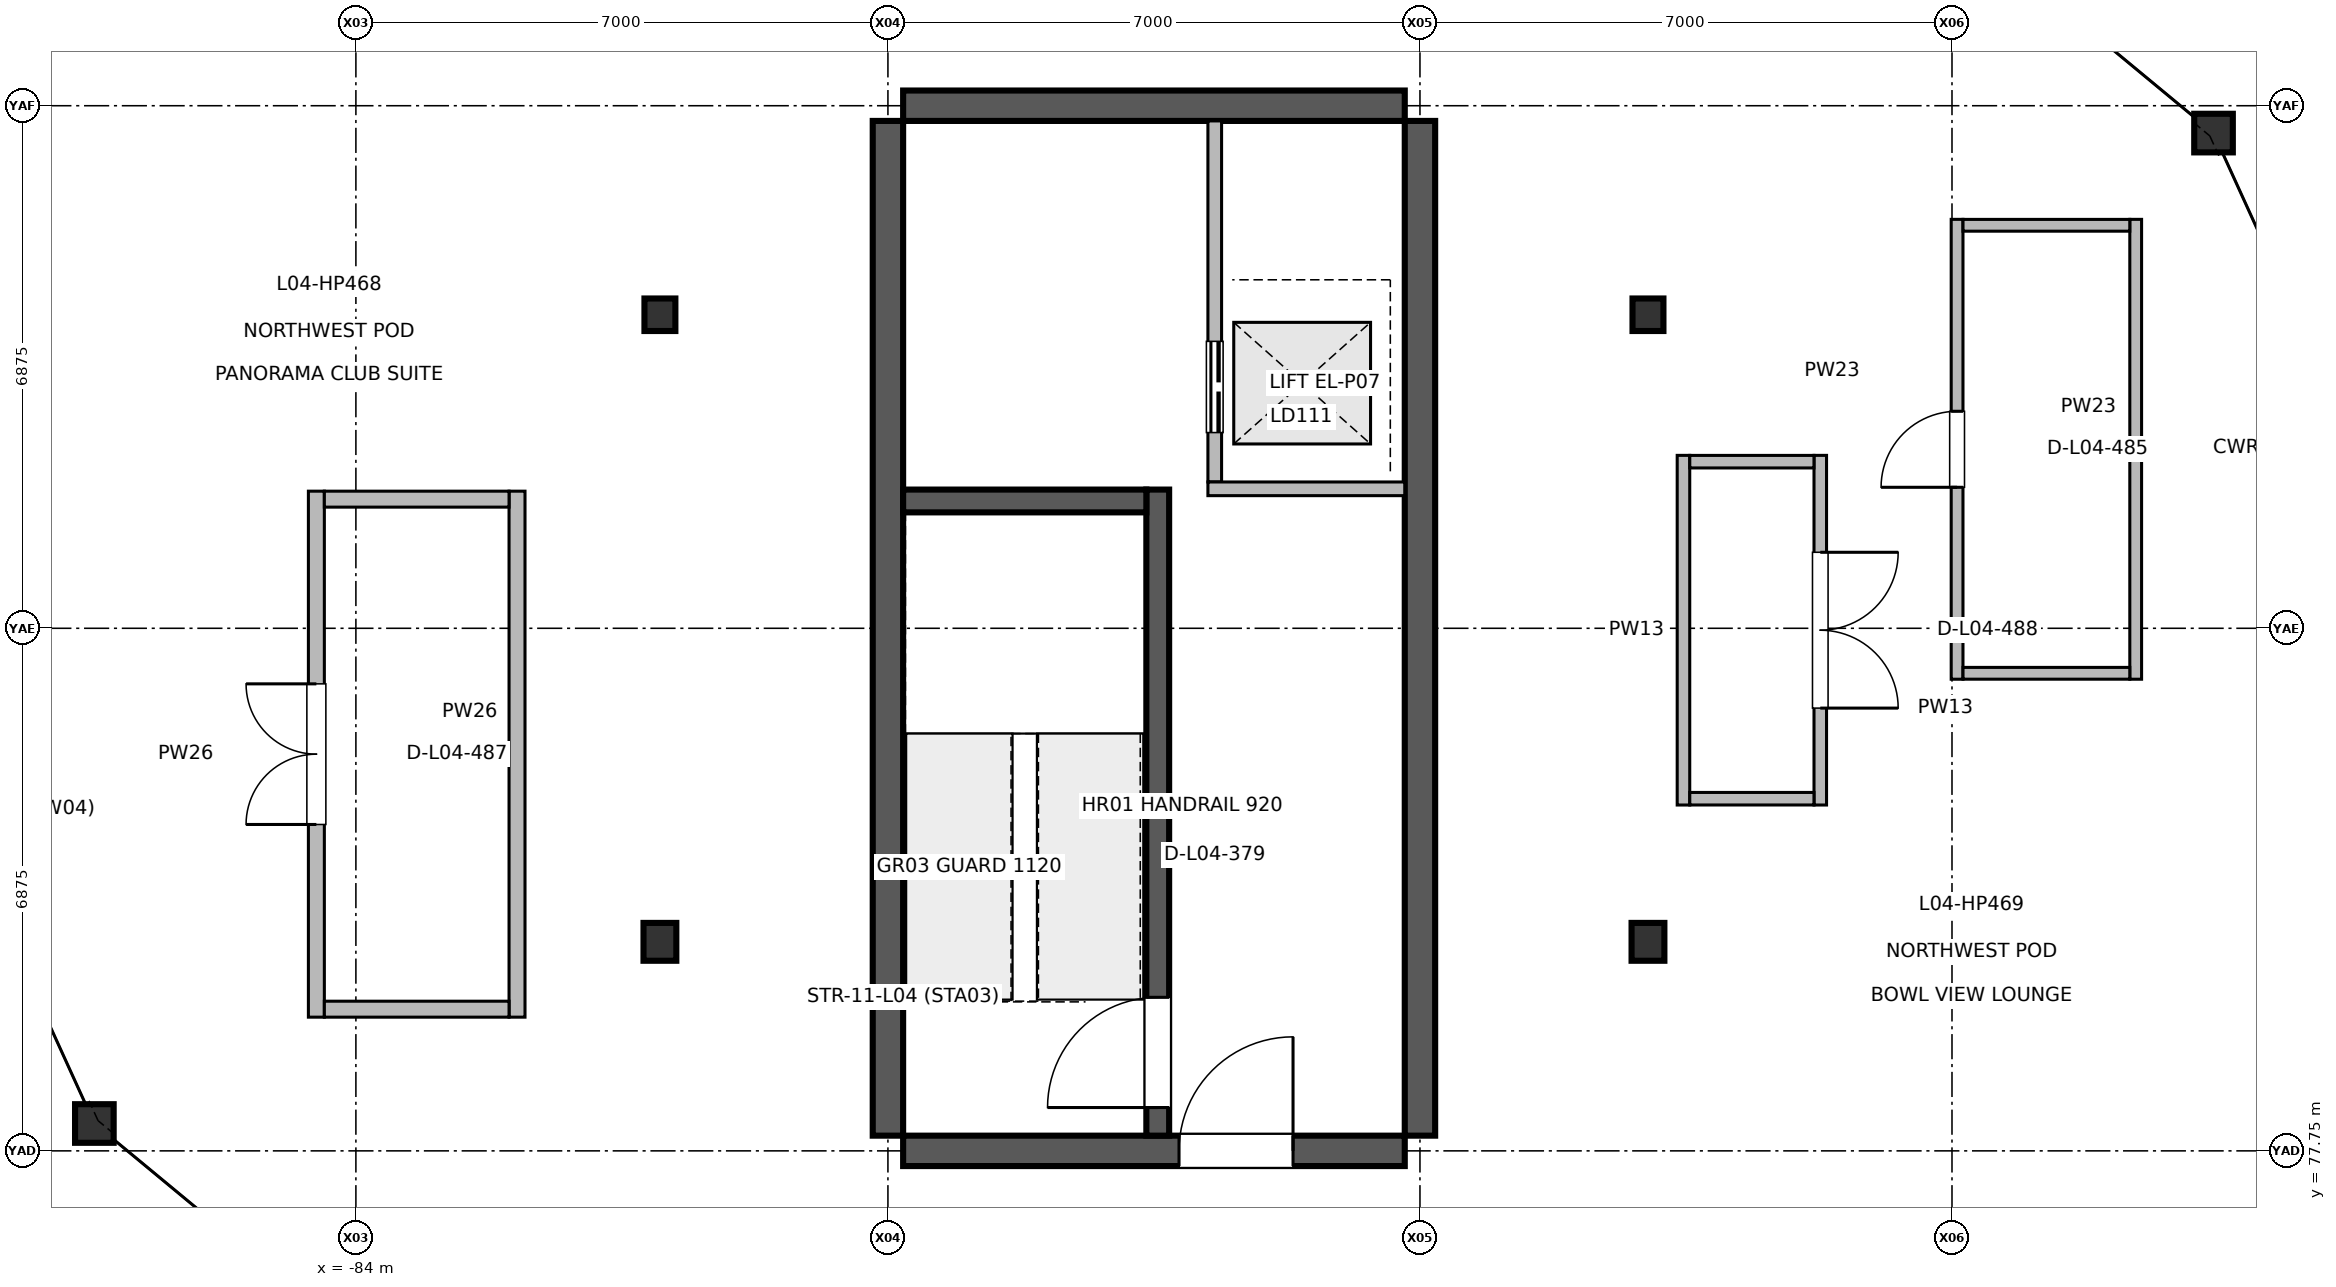
"""IFC4 building model, lengths in metres.
Left out: names, types, materials, properties, quantities, classifications, styles, units other than length and angle.
Written with IfcOpenShell. Run it as: python <this file> out.ifc"""

import sys

from ifc_helpers import new_model, si_unit, direction, frame, frame_2d, origin, origin_2d, place, context, subcontext, project, spatial, rectangle, hollow_circle, i_section, extrude, element, fill, save


model = new_model("IFC4")
c1 = context("Model", 3, precision=1e-05, world=origin(), true_north=direction((0.0, 1.0)))
c2 = subcontext(c1, "Body", "Model", "MODEL_VIEW")
j1 = project(units=[si_unit("LENGTHUNIT", "METRE"), si_unit("PLANEANGLEUNIT", "RADIAN")], contexts=[c1])
p1 = place(None, origin())
s1 = spatial("IfcSite", under=j1, at=p1, CompositionType="ELEMENT")
p2 = place(p1, origin())
s2 = spatial("IfcBuilding", under=s1, at=p2, CompositionType="ELEMENT")
p3 = place(p2, frame((0.0, 0.0, 16.2)))
s3 = spatial("IfcBuildingStorey", under=s2, at=p3, CompositionType="ELEMENT", Elevation=16.2)
for number, where, z_axis, x_axis in (
    (1, (-80.0, 80.5, 0.0), (0.0, 0.0, 1.0), (1.0, 0.0, 0.0)),
    (2, (-67.0, 80.5, 0.0), (0.0, 0.0, 1.0), (1.0, 0.0, 0.0)),
):
    element("IfcColumn", number, at=place(p3, frame(where, z_axis=z_axis, x_axis=x_axis)), inside=s3, PredefinedType="COLUMN", context=c2, shape_type="SweptSolid", body=[
        extrude(i_section(OverallWidth=0.432, OverallDepth=0.498, WebThickness=0.024, FlangeThickness=0.038, at=origin_2d()), origin(), (0.0, 0.0, 1.0), 4.798),
    ])
for number, where, z_axis, x_axis in (
    (3, (-80.0, 88.75, 0.0), (0.0, 0.0, 1.0), (1.0, 0.0, 0.0)),
    (4, (-67.0, 88.75, 0.0), (0.0, 0.0, 1.0), (1.0, 0.0, 0.0)),
):
    element("IfcColumn", number, at=place(p3, frame(where, z_axis=z_axis, x_axis=x_axis)), inside=s3, PredefinedType="COLUMN", context=c2, shape_type="SweptSolid", body=[
        extrude(i_section(OverallWidth=0.407, OverallDepth=0.428, WebThickness=0.02, FlangeThickness=0.035, at=origin_2d()), origin(), (0.0, 0.0, 1.0), 4.798),
    ])
for number, where, z_axis, x_axis in (
    (5, (-59.559, 91.14, 0.0), (0.0, 0.0, 1.0), (1.0, 0.0, 0.0)),
    (6, (-87.441, 78.11, 0.0), (0.0, 0.0, 1.0), (1.0, 0.0, 0.0)),
):
    element("IfcColumn", number, at=place(p3, frame(where, z_axis=z_axis, x_axis=x_axis)), inside=s3, PredefinedType="COLUMN", context=c2, shape_type="SweptSolid", body=[
        extrude(hollow_circle(Radius=0.254, WallThickness=0.025, at=origin_2d()), origin(), (0.0, 0.0, 1.0), 4.798),
    ])
for number, where, z_axis, x_axis in (
    (7, (-77.0, 77.95, 0.0), (0.0, 0.0, 1.0), (0.0, 1.0, 0.0)),
    (8, (-70.0, 77.95, 0.0), (0.0, 0.0, 1.0), (0.0, 1.0, 0.0)),
):
    element("IfcWall", number, at=place(p3, frame(where, z_axis=z_axis, x_axis=x_axis)), inside=s3, PredefinedType="SHEAR", context=c2, shape_type="SweptSolid", body=[
        extrude(rectangle(XDim=13.35, YDim=0.4, at=frame_2d((6.675, 0.0))), origin(), (0.0, 0.0, 1.0), 4.52),
    ])
p4 = place(p3, frame((-76.8, 77.75, 0.0), z_axis=(0.0, 0.0, 1.0), x_axis=(1.0, 0.0, 0.0)))
e9 = element("IfcWall", 9, at=p4, inside=s3, PredefinedType="SHEAR", context=c2, shape_type="SweptSolid", body=[
    extrude(rectangle(XDim=6.6, YDim=0.4, at=frame_2d((3.3, 0.0))), origin(), (0.0, 0.0, 1.0), 4.52),
])
p5 = place(p4, frame((3.63, 0.0, 0.0)))
e10 = element("IfcOpeningElement", 10, at=p5, cuts=e9, PredefinedType="OPENING", context=c2, shape_type="SweptSolid", body=[
    extrude(rectangle(XDim=1.5, YDim=2.2, at=frame_2d((0.75, 1.1))), frame((0.0, 0.21, 0.0), z_axis=(0.0, -1.0, 0.0), x_axis=(1.0, 0.0, 0.0)), (0.0, 0.0, 1.0), 0.42),
])
p6 = place(p3, frame((-76.8, 91.5, 0.0), z_axis=(0.0, 0.0, 1.0), x_axis=(1.0, 0.0, 0.0)))
e11 = element("IfcWall", 11, at=p6, inside=s3, PredefinedType="SHEAR", context=c2, shape_type="SweptSolid", body=[
    extrude(rectangle(XDim=6.6, YDim=0.4, at=frame_2d((3.3, 0.0))), origin(), (0.0, 0.0, 1.0), 4.52),
])
p7 = place(p3, frame((-73.45, 77.95, 0.0), z_axis=(0.0, 0.0, 1.0), x_axis=(0.0, 1.0, 0.0)))
e12 = element("IfcWall", 12, at=p7, inside=s3, PredefinedType="SHEAR", context=c2, shape_type="SweptSolid", body=[
    extrude(rectangle(XDim=8.5, YDim=0.3, at=frame_2d((4.25, 0.0))), origin(), (0.0, 0.0, 1.0), 4.52),
])
p8 = place(p7, frame((0.37, 0.0, 0.0)))
e13 = element("IfcOpeningElement", 13, at=p8, cuts=e12, PredefinedType="OPENING", context=c2, shape_type="SweptSolid", body=[
    extrude(rectangle(XDim=1.45, YDim=2.2, at=frame_2d((0.725, 1.1))), frame((0.0, 0.16, 0.0), z_axis=(0.0, -1.0, 0.0), x_axis=(1.0, 0.0, 0.0)), (0.0, 0.0, 1.0), 0.32),
])
p9 = place(p3, frame((-72.7, 86.55, 0.0), z_axis=(0.0, 0.0, 1.0), x_axis=(0.0, 1.0, 0.0)))
e14 = element("IfcWall", 14, at=p9, inside=s3, PredefinedType="PARTITIONING", context=c2, shape_type="SweptSolid", body=[
    extrude(rectangle(XDim=4.75, YDim=0.18, at=frame_2d((2.375, 0.0))), origin(), (0.0, 0.0, 1.0), 3.745),
])
p10 = place(p9, frame((0.65, 0.0, 0.0)))
e15 = element("IfcOpeningElement", 15, at=p10, cuts=e14, PredefinedType="OPENING", context=c2, shape_type="SweptSolid", body=[
    extrude(rectangle(XDim=1.2, YDim=2.25, at=frame_2d((0.6, 1.125))), frame((0.0, 0.1, 0.0), z_axis=(0.0, -1.0, 0.0), x_axis=(1.0, 0.0, 0.0)), (0.0, 0.0, 1.0), 0.2),
])
p11 = place(p3, frame((-62.933, 83.955, 0.0), z_axis=(0.0, 0.0, 1.0), x_axis=(0.0, 1.0, 0.0)))
e16 = element("IfcWall", 16, at=p11, inside=s3, PredefinedType="PARTITIONING", context=c2, shape_type="SweptSolid", body=[
    extrude(rectangle(XDim=6.05, YDim=0.155, at=frame_2d((3.025, 0.0))), origin(), (0.0, 0.0, 1.0), 3.82),
])
p12 = place(p11, frame((2.525, 0.0, 0.0)))
e17 = element("IfcOpeningElement", 17, at=p12, cuts=e16, PredefinedType="OPENING", context=c2, shape_type="SweptSolid", body=[
    extrude(rectangle(XDim=1.0, YDim=2.15, at=frame_2d((0.5, 1.075))), frame((0.0, 0.087, 0.0), z_axis=(0.0, -1.0, 0.0), x_axis=(1.0, 0.0, 0.0)), (0.0, 0.0, 1.0), 0.175),
])
p13 = place(p3, frame((-84.52, 79.509, 0.0), z_axis=(0.0, 0.0, 1.0), x_axis=(0.0, 1.0, 0.0)))
e18 = element("IfcWall", 18, at=p13, inside=s3, PredefinedType="PARTITIONING", context=c2, shape_type="SweptSolid", body=[
    extrude(rectangle(XDim=6.92, YDim=0.21, at=frame_2d((3.46, 0.0))), origin(), (0.0, 0.0, 1.0), 3.82),
])
p14 = place(p13, frame((2.535, 0.0, 0.0)))
e19 = element("IfcOpeningElement", 19, at=p14, cuts=e18, PredefinedType="OPENING", context=c2, shape_type="SweptSolid", body=[
    extrude(rectangle(XDim=1.85, YDim=2.4, at=frame_2d((0.925, 1.2))), frame((0.0, 0.115, 0.0), z_axis=(0.0, -1.0, 0.0), x_axis=(1.0, 0.0, 0.0)), (0.0, 0.0, 1.0), 0.23),
])
p15 = place(p3, frame((-64.733, 86.9, 0.0), z_axis=(0.0, 0.0, 1.0), x_axis=(0.0, -1.0, 0.0)))
e20 = element("IfcWall", 20, at=p15, inside=s3, PredefinedType="PARTITIONING", context=c2, shape_type="SweptSolid", body=[
    extrude(rectangle(XDim=4.6, YDim=0.165, at=frame_2d((2.3, 0.0))), origin(), (0.0, 0.0, 1.0), 3.82),
])
p16 = place(p15, frame((1.275, 0.0, 0.0)))
e21 = element("IfcOpeningElement", 21, at=p16, cuts=e20, PredefinedType="OPENING", context=c2, shape_type="SweptSolid", body=[
    extrude(rectangle(XDim=2.05, YDim=2.4, at=frame_2d((1.025, 1.2))), frame((0.0, 0.093, 0.0), z_axis=(0.0, -1.0, 0.0), x_axis=(1.0, 0.0, 0.0)), (0.0, 0.0, 1.0), 0.185),
])
p17 = place(p3, frame((-72.79, 86.46, 0.0), z_axis=(0.0, 0.0, 1.0), x_axis=(1.0, 0.0, 0.0)))
e22 = element("IfcWall", 22, at=p17, inside=s3, PredefinedType="PARTITIONING", context=c2, shape_type="SweptSolid", body=[
    extrude(rectangle(XDim=2.59, YDim=0.18, at=frame_2d((1.295, 0.0))), origin(), (0.0, 0.0, 1.0), 3.82),
])
p18 = place(p3, frame((-60.583, 83.955, 0.0), z_axis=(0.0, 0.0, 1.0), x_axis=(0.0, 1.0, 0.0)))
e23 = element("IfcWall", 23, at=p18, inside=s3, PredefinedType="PARTITIONING", context=c2, shape_type="SweptSolid", body=[
    extrude(rectangle(XDim=6.05, YDim=0.155, at=frame_2d((3.025, 0.0))), origin(), (0.0, 0.0, 1.0), 3.82),
])
for number, where, z_axis, x_axis in (
    (24, (-62.855, 84.033, 0.0), (0.0, 0.0, 1.0), (1.0, 0.0, 0.0)),
    (25, (-62.855, 89.927, 0.0), (0.0, 0.0, 1.0), (1.0, 0.0, 0.0)),
):
    element("IfcWall", number, at=place(p3, frame(where, z_axis=z_axis, x_axis=x_axis)), inside=s3, PredefinedType="PARTITIONING", context=c2, shape_type="SweptSolid", body=[
        extrude(rectangle(XDim=2.194, YDim=0.155, at=frame_2d((1.097, 0.0))), origin(), (0.0, 0.0, 1.0), 3.82),
    ])
p19 = place(p3, frame((-81.88, 79.509, 0.0), z_axis=(0.0, 0.0, 1.0), x_axis=(0.0, 1.0, 0.0)))
e26 = element("IfcWall", 26, at=p19, inside=s3, PredefinedType="PARTITIONING", context=c2, shape_type="SweptSolid", body=[
    extrude(rectangle(XDim=6.92, YDim=0.21, at=frame_2d((3.46, 0.0))), origin(), (0.0, 0.0, 1.0), 3.82),
])
for number, where, z_axis, x_axis in (
    (27, (-84.415, 79.614, 0.0), (0.0, 0.0, 1.0), (1.0, 0.0, 0.0)),
    (28, (-84.415, 86.324, 0.0), (0.0, 0.0, 1.0), (1.0, 0.0, 0.0)),
):
    element("IfcWall", number, at=place(p3, frame(where, z_axis=z_axis, x_axis=x_axis)), inside=s3, PredefinedType="PARTITIONING", context=c2, shape_type="SweptSolid", body=[
        extrude(rectangle(XDim=2.43, YDim=0.21, at=frame_2d((1.215, 0.0))), origin(), (0.0, 0.0, 1.0), 3.82),
    ])
p20 = place(p3, frame((-66.533, 82.3, 0.0), z_axis=(0.0, 0.0, 1.0), x_axis=(0.0, 1.0, 0.0)))
e29 = element("IfcWall", 29, at=p20, inside=s3, PredefinedType="PARTITIONING", context=c2, shape_type="SweptSolid", body=[
    extrude(rectangle(XDim=4.6, YDim=0.165, at=frame_2d((2.3, 0.0))), origin(), (0.0, 0.0, 1.0), 3.82),
])
for number, where, z_axis, x_axis in (
    (30, (-66.45, 82.383, 0.0), (0.0, 0.0, 1.0), (1.0, 0.0, 0.0)),
    (31, (-66.45, 86.817, 0.0), (0.0, 0.0, 1.0), (1.0, 0.0, 0.0)),
):
    element("IfcWall", number, at=place(p3, frame(where, z_axis=z_axis, x_axis=x_axis)), inside=s3, PredefinedType="PARTITIONING", context=c2, shape_type="SweptSolid", body=[
        extrude(rectangle(XDim=1.634, YDim=0.165, at=frame_2d((0.817, 0.0))), origin(), (0.0, 0.0, 1.0), 3.82),
    ])
p21 = place(p3, frame((-76.8, 86.3, 0.0), z_axis=(0.0, 0.0, 1.0), x_axis=(1.0, 0.0, 0.0)))
e32 = element("IfcWall", 32, at=p21, inside=s3, PredefinedType="SHEAR", context=c2, shape_type="SweptSolid", body=[
    extrude(rectangle(XDim=3.2, YDim=0.3, at=frame_2d((1.6, 0.0))), origin(), (0.0, 0.0, 1.0), 4.52),
])
p22 = place(p5, origin())
e33 = element("IfcDoor", 33, at=p22, inside=s3, OperationType="SINGLE_SWING_RIGHT", PredefinedType="DOOR", context=c2, shape_type="SweptSolid", body=[
    extrude(rectangle(XDim=1.5, YDim=2.2, at=frame_2d((0.75, 1.1))), frame((0.0, 0.025, 0.0), z_axis=(0.0, -1.0, 0.0), x_axis=(1.0, 0.0, 0.0)), (0.0, 0.0, 1.0), 0.05),
])
fill(e10, e33)
p23 = place(p8, origin())
e34 = element("IfcDoor", 34, at=p23, inside=s3, OperationType="SINGLE_SWING_LEFT", PredefinedType="DOOR", context=c2, shape_type="SweptSolid", body=[
    extrude(rectangle(XDim=1.45, YDim=2.2, at=frame_2d((0.725, 1.1))), frame((0.0, 0.025, 0.0), z_axis=(0.0, -1.0, 0.0), x_axis=(1.0, 0.0, 0.0)), (0.0, 0.0, 1.0), 0.05),
])
fill(e13, e34)
p24 = place(p10, origin())
e35 = element("IfcDoor", 35, at=p24, inside=s3, OperationType="DOUBLE_DOOR_SLIDING", PredefinedType="DOOR", context=c2, shape_type="SweptSolid", body=[
    extrude(rectangle(XDim=1.2, YDim=2.25, at=frame_2d((0.6, 1.125))), frame((0.0, 0.025, 0.0), z_axis=(0.0, -1.0, 0.0), x_axis=(1.0, 0.0, 0.0)), (0.0, 0.0, 1.0), 0.05),
])
fill(e15, e35)
p25 = place(p12, origin())
e36 = element("IfcDoor", 36, at=p25, inside=s3, OperationType="SINGLE_SWING_LEFT", PredefinedType="DOOR", context=c2, shape_type="SweptSolid", body=[
    extrude(rectangle(XDim=1.0, YDim=2.15, at=frame_2d((0.5, 1.075))), frame((0.0, 0.025, 0.0), z_axis=(0.0, -1.0, 0.0), x_axis=(1.0, 0.0, 0.0)), (0.0, 0.0, 1.0), 0.05),
])
fill(e17, e36)
p26 = place(p14, origin())
e37 = element("IfcDoor", 37, at=p26, inside=s3, OperationType="DOUBLE_DOOR_SINGLE_SWING", PredefinedType="DOOR", context=c2, shape_type="SweptSolid", body=[
    extrude(rectangle(XDim=1.85, YDim=2.4, at=frame_2d((0.925, 1.2))), frame((0.0, 0.025, 0.0), z_axis=(0.0, -1.0, 0.0), x_axis=(1.0, 0.0, 0.0)), (0.0, 0.0, 1.0), 0.05),
])
fill(e19, e37)
p27 = place(p16, origin())
e38 = element("IfcDoor", 38, at=p27, inside=s3, OperationType="DOUBLE_DOOR_SINGLE_SWING", PredefinedType="DOOR", context=c2, shape_type="SweptSolid", body=[
    extrude(rectangle(XDim=2.05, YDim=2.4, at=frame_2d((1.025, 1.2))), frame((0.0, 0.025, 0.0), z_axis=(0.0, -1.0, 0.0), x_axis=(1.0, 0.0, 0.0)), (0.0, 0.0, 1.0), 0.05),
])
fill(e21, e38)
save(model, sys.argv[1])
